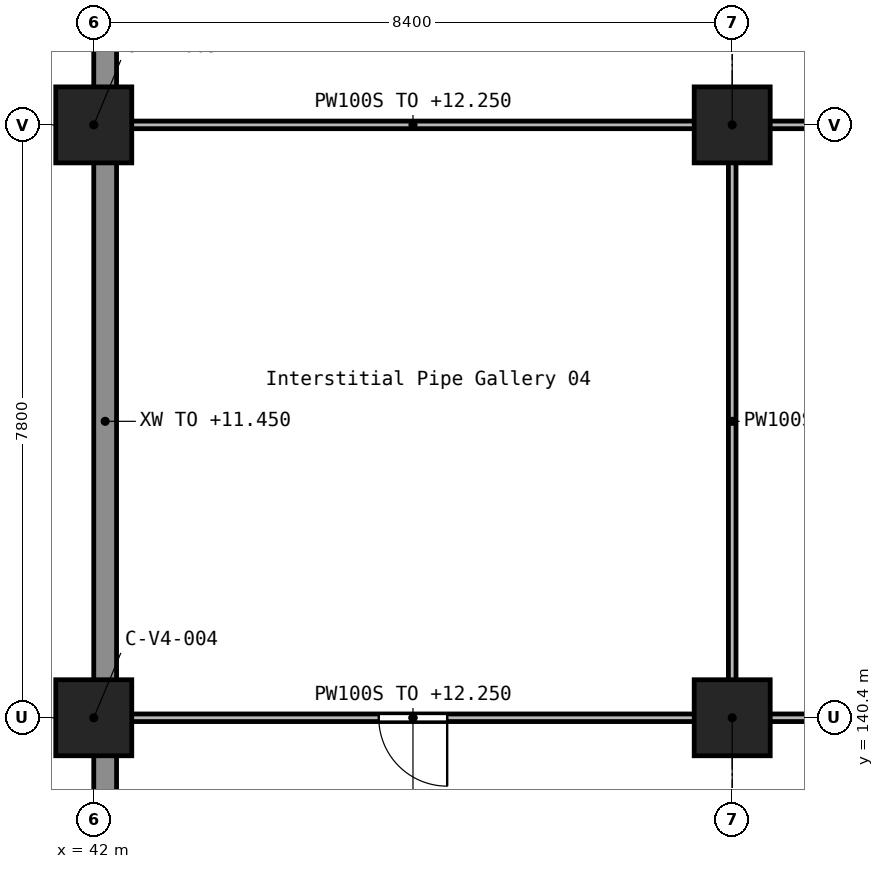
"""IFC4 building model, lengths in metres.
Left out: names, types, materials, properties, quantities, classifications, styles, units other than length and angle.
Written with IfcOpenShell. Run it as: python <this file> out.ifc"""

import sys

from ifc_helpers import new_model, si_unit, direction, frame, frame_2d, origin, origin_2d, place, context, subcontext, project, spatial, rectangle, extrude, element, fill, save


model = new_model("IFC4")
c1 = context("Model", 3, precision=1e-05, world=origin(), true_north=direction((0.0, 1.0)))
c2 = subcontext(c1, "Body", "Model", "MODEL_VIEW")
j1 = project(units=[si_unit("LENGTHUNIT", "METRE"), si_unit("PLANEANGLEUNIT", "RADIAN")], contexts=[c1])
p1 = place(None, origin())
s1 = spatial("IfcSite", under=j1, at=p1, CompositionType="ELEMENT")
p2 = place(p1, origin())
s2 = spatial("IfcBuilding", under=s1, at=p2, CompositionType="ELEMENT")
p3 = place(p2, frame((0.0, 0.0, 9.9)))
s3 = spatial("IfcBuildingStorey", under=s2, at=p3, CompositionType="ELEMENT", Elevation=9.9)
for number, where, z_axis, x_axis in (
    (1, (42.0, 140.4, 0.0), (0.0, 0.0, 1.0), (1.0, 0.0, 0.0)),
    (2, (42.0, 148.2, 0.0), (0.0, 0.0, 1.0), (1.0, 0.0, 0.0)),
    (3, (50.4, 140.4, 0.0), (0.0, 0.0, 1.0), (1.0, 0.0, 0.0)),
    (4, (50.4, 148.2, 0.0), (0.0, 0.0, 1.0), (1.0, 0.0, 0.0)),
):
    element("IfcColumn", number, at=place(p3, frame(where, z_axis=z_axis, x_axis=x_axis)), inside=s3, PredefinedType="COLUMN", context=c2, shape_type="SweptSolid", body=[
        extrude(rectangle(XDim=1.0, YDim=1.0, at=origin_2d()), origin(), (0.0, 0.0, 1.0), 2.7),
    ])
p4 = place(p3, frame((42.15, 151.35, 0.0), z_axis=(0.0, 0.0, 1.0), x_axis=(0.0, -1.0, 0.0)))
e5 = element("IfcWall", 5, at=p4, inside=s3, PredefinedType="STANDARD", context=c2, shape_type="SweptSolid", body=[
    extrude(rectangle(XDim=2.7, YDim=0.3, at=frame_2d((1.35, 0.0))), origin(), (0.0, 0.0, 1.0), 1.55),
])
p5 = place(p3, frame((42.15, 147.75, 0.0), z_axis=(0.0, 0.0, 1.0), x_axis=(0.0, -1.0, 0.0)))
e6 = element("IfcWall", 6, at=p5, inside=s3, PredefinedType="STANDARD", context=c2, shape_type="SweptSolid", body=[
    extrude(rectangle(XDim=6.9, YDim=0.3, at=frame_2d((3.45, 0.0))), origin(), (0.0, 0.0, 1.0), 1.55),
])
p6 = place(p3, frame((42.15, 139.95, 0.0), z_axis=(0.0, 0.0, 1.0), x_axis=(0.0, -1.0, 0.0)))
e7 = element("IfcWall", 7, at=p6, inside=s3, PredefinedType="STANDARD", context=c2, shape_type="SweptSolid", body=[
    extrude(rectangle(XDim=2.7, YDim=0.3, at=frame_2d((1.35, 0.0))), origin(), (0.0, 0.0, 1.0), 1.55),
])
p7 = place(p3, frame((58.35, 140.4, 0.0), z_axis=(0.0, 0.0, 1.0), x_axis=(-1.0, 0.0, 0.0)))
e8 = element("IfcWall", 8, at=p7, inside=s3, PredefinedType="PARTITIONING", context=c2, shape_type="SweptSolid", body=[
    extrude(rectangle(XDim=7.5, YDim=0.1, at=frame_2d((3.75, 0.0))), origin(), (0.0, 0.0, 1.0), 2.35),
])
p8 = place(p7, frame((4.5, 0.0, 0.0)))
e9 = element("IfcOpeningElement", 9, at=p8, cuts=e8, PredefinedType="OPENING", context=c2, shape_type="SweptSolid", body=[
    extrude(rectangle(XDim=0.9, YDim=2.1, at=frame_2d((0.45, 1.05))), frame((0.0, 0.06, 0.0), z_axis=(0.0, -1.0, 0.0), x_axis=(1.0, 0.0, 0.0)), (0.0, 0.0, 1.0), 0.12),
])
p9 = place(p3, frame((49.95, 140.4, 0.0), z_axis=(0.0, 0.0, 1.0), x_axis=(-1.0, 0.0, 0.0)))
e10 = element("IfcWall", 10, at=p9, inside=s3, PredefinedType="PARTITIONING", context=c2, shape_type="SweptSolid", body=[
    extrude(rectangle(XDim=7.5, YDim=0.1, at=frame_2d((3.75, 0.0))), origin(), (0.0, 0.0, 1.0), 2.35),
])
p10 = place(p9, frame((3.3, 0.0, 0.0)))
e11 = element("IfcOpeningElement", 11, at=p10, cuts=e10, PredefinedType="OPENING", context=c2, shape_type="SweptSolid", body=[
    extrude(rectangle(XDim=0.9, YDim=2.1, at=frame_2d((0.45, 1.05))), frame((0.0, 0.06, 0.0), z_axis=(0.0, -1.0, 0.0), x_axis=(1.0, 0.0, 0.0)), (0.0, 0.0, 1.0), 0.12),
])
for number, where, z_axis, x_axis in (
    (12, (58.35, 148.2, 0.0), (0.0, 0.0, 1.0), (-1.0, 0.0, 0.0)),
    (13, (49.95, 148.2, 0.0), (0.0, 0.0, 1.0), (-1.0, 0.0, 0.0)),
):
    element("IfcWall", number, at=place(p3, frame(where, z_axis=z_axis, x_axis=x_axis)), inside=s3, PredefinedType="PARTITIONING", context=c2, shape_type="SweptSolid", body=[
        extrude(rectangle(XDim=7.5, YDim=0.1, at=frame_2d((3.75, 0.0))), origin(), (0.0, 0.0, 1.0), 2.35),
    ])
p11 = place(p3, frame((50.4, 140.85, 0.0), z_axis=(0.0, 0.0, 1.0), x_axis=(0.0, 1.0, 0.0)))
e14 = element("IfcWall", 14, at=p11, inside=s3, PredefinedType="PARTITIONING", context=c2, shape_type="SweptSolid", body=[
    extrude(rectangle(XDim=6.9, YDim=0.1, at=frame_2d((3.45, 0.0))), origin(), (0.0, 0.0, 1.0), 2.35),
])
p12 = place(p10, frame((0.9, 0.0, 0.0), z_axis=(0.0, 0.0, 1.0), x_axis=(-1.0, 0.0, 0.0)))
e15 = element("IfcDoor", 15, at=p12, inside=s3, OperationType="SINGLE_SWING_LEFT", PredefinedType="DOOR", context=c2, shape_type="SweptSolid", body=[
    extrude(rectangle(XDim=0.9, YDim=2.1, at=frame_2d((0.45, 1.05))), frame((0.0, 0.025, 0.0), z_axis=(0.0, -1.0, 0.0), x_axis=(1.0, 0.0, 0.0)), (0.0, 0.0, 1.0), 0.05),
])
fill(e11, e15)
save(model, sys.argv[1])
